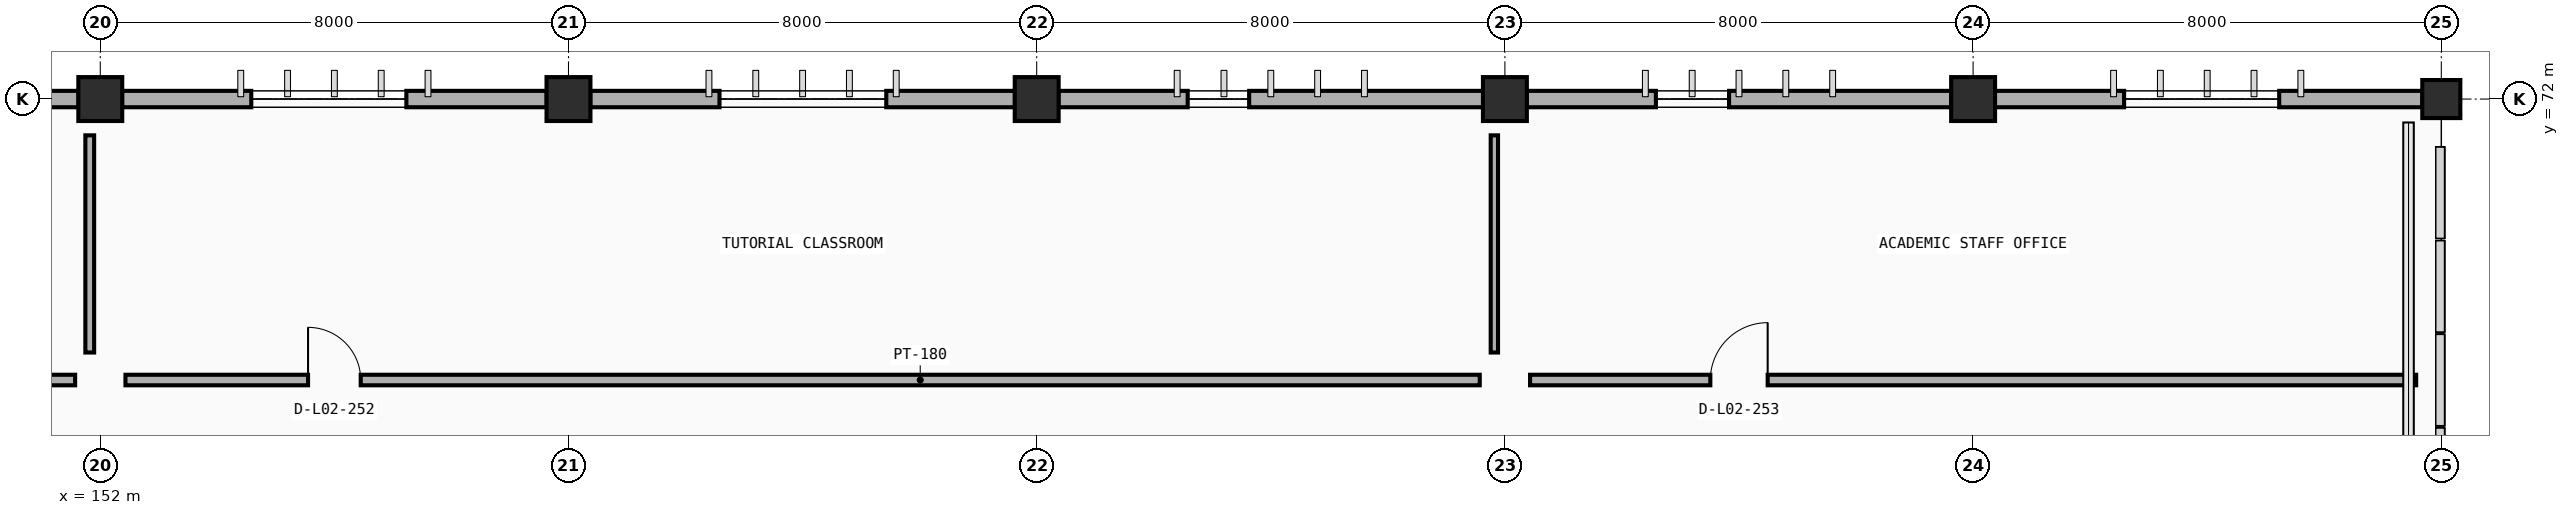
"""IFC4 building model, lengths in metres.
Left out: names, types, materials, properties, quantities, classifications, styles, units other than length and angle.
Written with IfcOpenShell. Run it as: python <this file> out.ifc"""

import sys

from ifc_helpers import new_model, si_unit, direction, frame, frame_2d, origin, origin_2d, place, context, subcontext, project, spatial, rectangle, extrude, element, fill, save


model = new_model("IFC4")
c1 = context("Model", 3, precision=1e-05, world=origin(), true_north=direction((0.0, 1.0)))
c2 = subcontext(c1, "Body", "Model", "MODEL_VIEW")
j1 = project(units=[si_unit("LENGTHUNIT", "METRE"), si_unit("PLANEANGLEUNIT", "RADIAN")], contexts=[c1])
p1 = place(None, origin())
s1 = spatial("IfcSite", under=j1, at=p1, CompositionType="ELEMENT")
p2 = place(p1, origin())
s2 = spatial("IfcBuilding", under=s1, at=p2, CompositionType="ELEMENT")
p3 = place(p2, frame((0.0, 0.0, 4.8)))
s3 = spatial("IfcBuildingStorey", under=s2, at=p3, CompositionType="ELEMENT", Elevation=4.8)
for number, where, z_axis, x_axis in (
    (1, (152.0, 72.0, 0.0), (0.0, 0.0, 1.0), (1.0, 0.0, 0.0)),
    (2, (160.0, 72.0, 0.0), (0.0, 0.0, 1.0), (1.0, 0.0, 0.0)),
    (3, (168.0, 72.0, 0.0), (0.0, 0.0, 1.0), (1.0, 0.0, 0.0)),
    (4, (176.0, 72.0, 0.0), (0.0, 0.0, 1.0), (1.0, 0.0, 0.0)),
    (5, (184.0, 72.0, 0.0), (0.0, 0.0, 1.0), (1.0, 0.0, 0.0)),
):
    element("IfcColumn", number, at=place(p3, frame(where, z_axis=z_axis, x_axis=x_axis)), inside=s3, PredefinedType="COLUMN", context=c2, shape_type="SweptSolid", body=[
        extrude(rectangle(XDim=0.75, YDim=0.75, at=origin_2d()), origin(), (0.0, 0.0, 1.0), 4.8),
    ])
p4 = place(p3, frame((192.0, 72.0, 0.0), z_axis=(0.0, 0.0, 1.0), x_axis=(1.0, 0.0, 0.0)))
e6 = element("IfcColumn", 6, at=p4, inside=s3, PredefinedType="COLUMN", context=c2, shape_type="SweptSolid", body=[
    extrude(rectangle(XDim=0.65, YDim=0.65, at=origin_2d()), origin(), (0.0, 0.0, 1.0), 4.8),
])
p5 = place(p3, frame((144.372, 72.0, 0.0), z_axis=(0.0, 0.0, 1.0), x_axis=(1.0, 0.0, 0.0)))
e7 = element("IfcWall", 7, at=p5, inside=s3, PredefinedType="STANDARD", context=c2, shape_type="SweptSolid", body=[
    extrude(rectangle(XDim=7.256, YDim=0.28, at=frame_2d((3.628, 0.0))), origin(), (0.0, 0.0, 1.0), 3.91),
])
p6 = place(p5, frame((2.208, 0.0, 0.9)))
e8 = element("IfcOpeningElement", 8, at=p6, cuts=e7, PredefinedType="OPENING", context=c2, shape_type="SweptSolid", body=[
    extrude(rectangle(XDim=1.25, YDim=2.0, at=frame_2d((0.625, 1.0))), frame((0.0, 0.15, 0.0), z_axis=(0.0, -1.0, 0.0), x_axis=(1.0, 0.0, 0.0)), (0.0, 0.0, 1.0), 0.3),
])
p7 = place(p3, frame((152.372, 72.0, 0.0), z_axis=(0.0, 0.0, 1.0), x_axis=(1.0, 0.0, 0.0)))
e9 = element("IfcWall", 9, at=p7, inside=s3, PredefinedType="STANDARD", context=c2, shape_type="SweptSolid", body=[
    extrude(rectangle(XDim=7.256, YDim=0.28, at=frame_2d((3.628, 0.0))), origin(), (0.0, 0.0, 1.0), 3.91),
])
p8 = place(p7, frame((2.208, 0.0, 0.9)))
e10 = element("IfcOpeningElement", 10, at=p8, cuts=e9, PredefinedType="OPENING", context=c2, shape_type="SweptSolid", body=[
    extrude(rectangle(XDim=2.65, YDim=1.85, at=frame_2d((1.325, 0.925))), frame((0.0, 0.15, 0.0), z_axis=(0.0, -1.0, 0.0), x_axis=(1.0, 0.0, 0.0)), (0.0, 0.0, 1.0), 0.3),
])
p9 = place(p3, frame((160.372, 72.0, 0.0), z_axis=(0.0, 0.0, 1.0), x_axis=(1.0, 0.0, 0.0)))
e11 = element("IfcWall", 11, at=p9, inside=s3, PredefinedType="STANDARD", context=c2, shape_type="SweptSolid", body=[
    extrude(rectangle(XDim=7.256, YDim=0.28, at=frame_2d((3.628, 0.0))), origin(), (0.0, 0.0, 1.0), 3.91),
])
p10 = place(p9, frame((2.208, 0.0, 0.9)))
e12 = element("IfcOpeningElement", 12, at=p10, cuts=e11, PredefinedType="OPENING", context=c2, shape_type="SweptSolid", body=[
    extrude(rectangle(XDim=2.85, YDim=1.85, at=frame_2d((1.425, 0.925))), frame((0.0, 0.15, 0.0), z_axis=(0.0, -1.0, 0.0), x_axis=(1.0, 0.0, 0.0)), (0.0, 0.0, 1.0), 0.3),
])
p11 = place(p3, frame((168.372, 72.0, 0.0), z_axis=(0.0, 0.0, 1.0), x_axis=(1.0, 0.0, 0.0)))
e13 = element("IfcWall", 13, at=p11, inside=s3, PredefinedType="STANDARD", context=c2, shape_type="SweptSolid", body=[
    extrude(rectangle(XDim=7.256, YDim=0.28, at=frame_2d((3.628, 0.0))), origin(), (0.0, 0.0, 1.0), 3.91),
])
p12 = place(p11, frame((2.208, 0.0, 0.9)))
e14 = element("IfcOpeningElement", 14, at=p12, cuts=e13, PredefinedType="OPENING", context=c2, shape_type="SweptSolid", body=[
    extrude(rectangle(XDim=1.05, YDim=2.0, at=frame_2d((0.525, 1.0))), frame((0.0, 0.15, 0.0), z_axis=(0.0, -1.0, 0.0), x_axis=(1.0, 0.0, 0.0)), (0.0, 0.0, 1.0), 0.3),
])
p13 = place(p3, frame((176.372, 72.0, 0.0), z_axis=(0.0, 0.0, 1.0), x_axis=(1.0, 0.0, 0.0)))
e15 = element("IfcWall", 15, at=p13, inside=s3, PredefinedType="STANDARD", context=c2, shape_type="SweptSolid", body=[
    extrude(rectangle(XDim=7.256, YDim=0.28, at=frame_2d((3.628, 0.0))), origin(), (0.0, 0.0, 1.0), 3.91),
])
p14 = place(p13, frame((2.208, 0.0, 0.9)))
e16 = element("IfcOpeningElement", 16, at=p14, cuts=e15, PredefinedType="OPENING", context=c2, shape_type="SweptSolid", body=[
    extrude(rectangle(XDim=1.25, YDim=2.0, at=frame_2d((0.625, 1.0))), frame((0.0, 0.15, 0.0), z_axis=(0.0, -1.0, 0.0), x_axis=(1.0, 0.0, 0.0)), (0.0, 0.0, 1.0), 0.3),
])
p15 = place(p3, frame((184.372, 72.0, 0.0), z_axis=(0.0, 0.0, 1.0), x_axis=(1.0, 0.0, 0.0)))
e17 = element("IfcWall", 17, at=p15, inside=s3, PredefinedType="STANDARD", context=c2, shape_type="SweptSolid", body=[
    extrude(rectangle(XDim=7.306, YDim=0.28, at=frame_2d((3.653, 0.0))), origin(), (0.0, 0.0, 1.0), 3.91),
])
p16 = place(p15, frame((2.208, 0.0, 0.9)))
e18 = element("IfcOpeningElement", 18, at=p16, cuts=e17, PredefinedType="OPENING", context=c2, shape_type="SweptSolid", body=[
    extrude(rectangle(XDim=2.65, YDim=1.85, at=frame_2d((1.325, 0.925))), frame((0.0, 0.15, 0.0), z_axis=(0.0, -1.0, 0.0), x_axis=(1.0, 0.0, 0.0)), (0.0, 0.0, 1.0), 0.3),
])
p17 = place(p3, frame((191.76, 71.78, 0.0), z_axis=(0.0, 0.0, 1.0), x_axis=(-1.0, 0.0, 0.0)))
e19 = element("IfcWall", 19, at=p17, inside=s3, PredefinedType="PARAPET", context=c2, shape_type="SweptSolid", body=[
    extrude(rectangle(XDim=0.32, YDim=0.2, at=frame_2d((0.16, 0.0))), origin(), (0.0, 0.0, 1.0), 3.95),
])
p18 = place(p3, frame((128.43, 67.2, 0.0), z_axis=(0.0, 0.0, 1.0), x_axis=(1.0, 0.0, 0.0)))
e20 = element("IfcWall", 20, at=p18, inside=s3, PredefinedType="PARTITIONING", context=c2, shape_type="SweptSolid", body=[
    extrude(rectangle(XDim=23.14, YDim=0.18, at=frame_2d((11.57, 0.0))), origin(), (0.0, 0.0, 1.0), 3.9),
])
p19 = place(p18, frame((2.74, 0.0, 0.0)))
e21 = element("IfcOpeningElement", 21, at=p19, cuts=e20, PredefinedType="OPENING", context=c2, shape_type="SweptSolid", body=[
    extrude(rectangle(XDim=1.66, YDim=2.22, at=frame_2d((0.83, 1.11))), frame((0.0, 0.1, 0.0), z_axis=(0.0, -1.0, 0.0), x_axis=(1.0, 0.0, 0.0)), (0.0, 0.0, 1.0), 0.2),
])
p20 = place(p3, frame((151.82, 67.67, 0.0), z_axis=(0.0, 0.0, 1.0), x_axis=(0.0, 1.0, 0.0)))
e22 = element("IfcWall", 22, at=p20, inside=s3, PredefinedType="PARTITIONING", context=c2, shape_type="SweptSolid", body=[
    extrude(rectangle(XDim=3.71, YDim=0.15, at=frame_2d((1.855, 0.0))), origin(), (0.0, 0.0, 1.0), 3.76),
])
p21 = place(p3, frame((152.43, 67.2, 0.0), z_axis=(0.0, 0.0, 1.0), x_axis=(1.0, 0.0, 0.0)))
e23 = element("IfcWall", 23, at=p21, inside=s3, PredefinedType="PARTITIONING", context=c2, shape_type="SweptSolid", body=[
    extrude(rectangle(XDim=23.14, YDim=0.18, at=frame_2d((11.57, 0.0))), origin(), (0.0, 0.0, 1.0), 3.9),
])
p22 = place(p21, frame((3.12, 0.0, 0.0)))
e24 = element("IfcOpeningElement", 24, at=p22, cuts=e23, PredefinedType="OPENING", context=c2, shape_type="SweptSolid", body=[
    extrude(rectangle(XDim=0.9, YDim=2.1, at=frame_2d((0.45, 1.05))), frame((0.0, 0.1, 0.0), z_axis=(0.0, -1.0, 0.0), x_axis=(1.0, 0.0, 0.0)), (0.0, 0.0, 1.0), 0.2),
])
p23 = place(p3, frame((175.82, 67.67, 0.0), z_axis=(0.0, 0.0, 1.0), x_axis=(0.0, 1.0, 0.0)))
e25 = element("IfcWall", 25, at=p23, inside=s3, PredefinedType="PARTITIONING", context=c2, shape_type="SweptSolid", body=[
    extrude(rectangle(XDim=3.71, YDim=0.125, at=frame_2d((1.855, 0.0))), origin(), (0.0, 0.0, 1.0), 3.76),
])
p24 = place(p3, frame((176.43, 67.2, 0.0), z_axis=(0.0, 0.0, 1.0), x_axis=(1.0, 0.0, 0.0)))
e26 = element("IfcWall", 26, at=p24, inside=s3, PredefinedType="PARTITIONING", context=c2, shape_type="SweptSolid", body=[
    extrude(rectangle(XDim=15.14, YDim=0.18, at=frame_2d((7.57, 0.0))), origin(), (0.0, 0.0, 1.0), 3.9),
])
p25 = place(p24, frame((3.08, 0.0, 0.0)))
e27 = element("IfcOpeningElement", 27, at=p25, cuts=e26, PredefinedType="OPENING", context=c2, shape_type="SweptSolid", body=[
    extrude(rectangle(XDim=0.98, YDim=2.1, at=frame_2d((0.49, 1.05))), frame((0.0, 0.1, 0.0), z_axis=(0.0, -1.0, 0.0), x_axis=(1.0, 0.0, 0.0)), (0.0, 0.0, 1.0), 0.2),
])
p26 = place(p8, origin())
e28 = element("IfcWindow", 28, at=p26, inside=s3, PartitioningType="DOUBLE_PANEL_VERTICAL", PredefinedType="WINDOW", context=c2, shape_type="SweptSolid", body=[
    extrude(rectangle(XDim=2.65, YDim=1.85, at=frame_2d((1.325, 0.925))), frame((0.0, 0.03, 0.0), z_axis=(0.0, -1.0, 0.0), x_axis=(1.0, 0.0, 0.0)), (0.0, 0.0, 1.0), 0.06),
])
fill(e10, e28)
p27 = place(p10, origin())
e29 = element("IfcWindow", 29, at=p27, inside=s3, PartitioningType="DOUBLE_PANEL_VERTICAL", PredefinedType="WINDOW", context=c2, shape_type="SweptSolid", body=[
    extrude(rectangle(XDim=2.85, YDim=1.85, at=frame_2d((1.425, 0.925))), frame((0.0, 0.03, 0.0), z_axis=(0.0, -1.0, 0.0), x_axis=(1.0, 0.0, 0.0)), (0.0, 0.0, 1.0), 0.06),
])
fill(e12, e29)
p28 = place(p12, origin())
e30 = element("IfcWindow", 30, at=p28, inside=s3, PartitioningType="SINGLE_PANEL", PredefinedType="WINDOW", context=c2, shape_type="SweptSolid", body=[
    extrude(rectangle(XDim=1.05, YDim=2.0, at=frame_2d((0.525, 1.0))), frame((0.0, 0.03, 0.0), z_axis=(0.0, -1.0, 0.0), x_axis=(1.0, 0.0, 0.0)), (0.0, 0.0, 1.0), 0.06),
])
fill(e14, e30)
p29 = place(p14, origin())
e31 = element("IfcWindow", 31, at=p29, inside=s3, PartitioningType="SINGLE_PANEL", PredefinedType="WINDOW", context=c2, shape_type="SweptSolid", body=[
    extrude(rectangle(XDim=1.25, YDim=2.0, at=frame_2d((0.625, 1.0))), frame((0.0, 0.03, 0.0), z_axis=(0.0, -1.0, 0.0), x_axis=(1.0, 0.0, 0.0)), (0.0, 0.0, 1.0), 0.06),
])
fill(e16, e31)
p30 = place(p16, origin())
e32 = element("IfcWindow", 32, at=p30, inside=s3, PartitioningType="DOUBLE_PANEL_VERTICAL", PredefinedType="WINDOW", context=c2, shape_type="SweptSolid", body=[
    extrude(rectangle(XDim=2.65, YDim=1.85, at=frame_2d((1.325, 0.925))), frame((0.0, 0.03, 0.0), z_axis=(0.0, -1.0, 0.0), x_axis=(1.0, 0.0, 0.0)), (0.0, 0.0, 1.0), 0.06),
])
fill(e18, e32)
p31 = place(p22, origin())
e33 = element("IfcDoor", 33, at=p31, inside=s3, OperationType="SINGLE_SWING_LEFT", PredefinedType="DOOR", context=c2, shape_type="SweptSolid", body=[
    extrude(rectangle(XDim=0.9, YDim=2.1, at=frame_2d((0.45, 1.05))), frame((0.0, 0.025, 0.0), z_axis=(0.0, -1.0, 0.0), x_axis=(1.0, 0.0, 0.0)), (0.0, 0.0, 1.0), 0.05),
])
fill(e24, e33)
p32 = place(p25, origin())
e34 = element("IfcDoor", 34, at=p32, inside=s3, OperationType="SINGLE_SWING_RIGHT", PredefinedType="DOOR", context=c2, shape_type="SweptSolid", body=[
    extrude(rectangle(XDim=0.98, YDim=2.1, at=frame_2d((0.49, 1.05))), frame((0.0, 0.025, 0.0), z_axis=(0.0, -1.0, 0.0), x_axis=(1.0, 0.0, 0.0)), (0.0, 0.0, 1.0), 0.05),
])
fill(e27, e34)
save(model, sys.argv[1])
